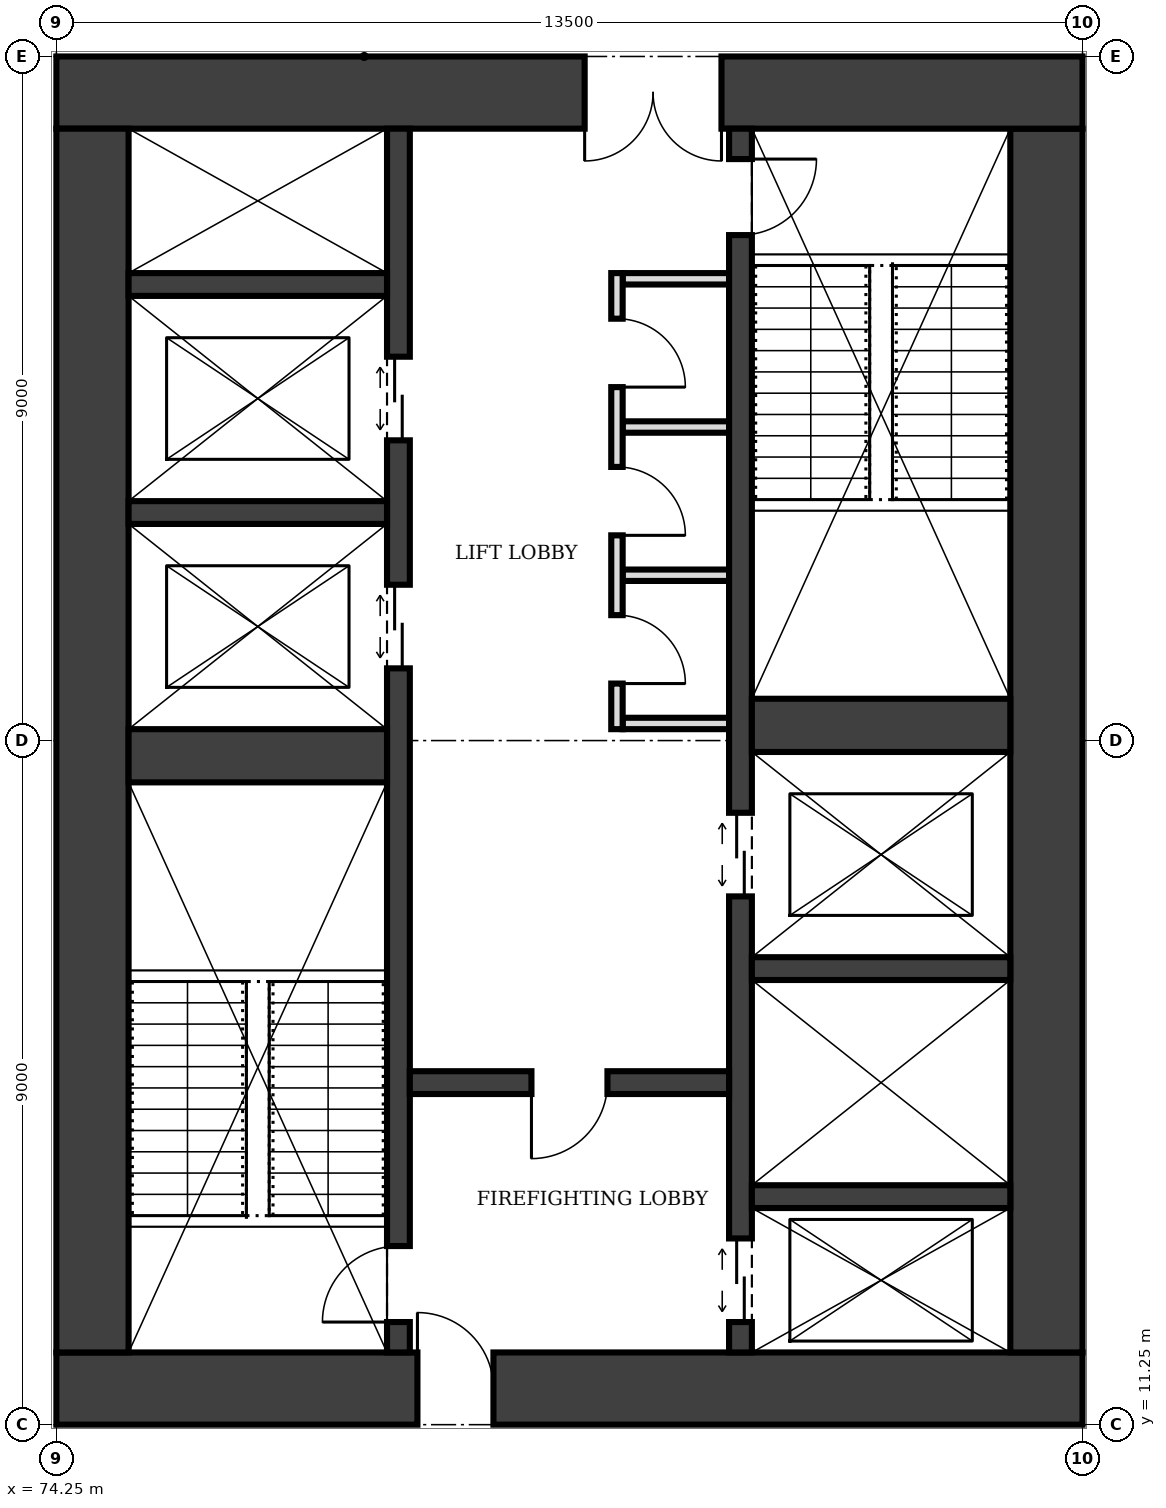
"""IFC4 building model, lengths in metres.
Left out: names, types, materials, properties, quantities, classifications, styles, units other than length and angle.
Written with IfcOpenShell. Run it as: python <this file> out.ifc"""

import sys

from ifc_helpers import new_model, si_unit, direction, frame, frame_2d, origin, place, context, subcontext, project, spatial, rectangle, extrude, element, fill, save


model = new_model("IFC4")
c1 = context("Model", 3, precision=1e-05, world=origin(), true_north=direction((0.0, 1.0)))
c2 = subcontext(c1, "Body", "Model", "MODEL_VIEW")
j1 = project(units=[si_unit("LENGTHUNIT", "METRE"), si_unit("PLANEANGLEUNIT", "RADIAN")], contexts=[c1])
p1 = place(None, origin())
s1 = spatial("IfcSite", under=j1, at=p1, CompositionType="ELEMENT")
p2 = place(p1, origin())
s2 = spatial("IfcBuilding", under=s1, at=p2, CompositionType="ELEMENT")
p3 = place(p2, frame((0.0, 0.0, 45.0)))
s3 = spatial("IfcBuildingStorey", under=s2, at=p3, CompositionType="ELEMENT", Elevation=45.0)
p4 = place(p3, frame((74.25, 11.725, 0.0), z_axis=(0.0, 0.0, 1.0), x_axis=(1.0, 0.0, 0.0)))
e1 = element("IfcWall", 1, at=p4, inside=s3, PredefinedType="SHEAR", context=c2, shape_type="SweptSolid", body=[
    extrude(rectangle(XDim=13.5, YDim=0.95, at=frame_2d((6.75, 0.0))), origin(), (0.0, 0.0, 1.0), 4.0),
])
p5 = place(p4, frame((4.75, 0.0, 0.0)))
e2 = element("IfcOpeningElement", 2, at=p5, cuts=e1, PredefinedType="OPENING", context=c2, shape_type="SweptSolid", body=[
    extrude(rectangle(XDim=1.0, YDim=2.1, at=frame_2d((0.5, 1.05))), frame((0.0, 0.485, 0.0), z_axis=(0.0, -1.0, 0.0), x_axis=(1.0, 0.0, 0.0)), (0.0, 0.0, 1.0), 0.97),
])
p6 = place(p3, frame((87.275, 12.2, 0.0), z_axis=(0.0, 0.0, 1.0), x_axis=(0.0, 1.0, 0.0)))
e3 = element("IfcWall", 3, at=p6, inside=s3, PredefinedType="SHEAR", context=c2, shape_type="SweptSolid", body=[
    extrude(rectangle(XDim=16.1, YDim=0.95, at=frame_2d((8.05, 0.0))), origin(), (0.0, 0.0, 1.0), 4.0),
])
p7 = place(p3, frame((87.75, 28.775, 0.0), z_axis=(0.0, 0.0, 1.0), x_axis=(-1.0, 0.0, 0.0)))
e4 = element("IfcWall", 4, at=p7, inside=s3, PredefinedType="SHEAR", context=c2, shape_type="SweptSolid", body=[
    extrude(rectangle(XDim=13.5, YDim=0.95, at=frame_2d((6.75, 0.0))), origin(), (0.0, 0.0, 1.0), 4.0),
])
p8 = place(p7, frame((4.75, 0.0, 0.0)))
e5 = element("IfcOpeningElement", 5, at=p8, cuts=e4, PredefinedType="OPENING", context=c2, shape_type="SweptSolid", body=[
    extrude(rectangle(XDim=1.8, YDim=2.1, at=frame_2d((0.9, 1.05))), frame((0.0, 0.485, 0.0), z_axis=(0.0, -1.0, 0.0), x_axis=(1.0, 0.0, 0.0)), (0.0, 0.0, 1.0), 0.97),
])
p9 = place(p3, frame((74.725, 28.3, 0.0), z_axis=(0.0, 0.0, 1.0), x_axis=(0.0, -1.0, 0.0)))
e6 = element("IfcWall", 6, at=p9, inside=s3, PredefinedType="SHEAR", context=c2, shape_type="SweptSolid", body=[
    extrude(rectangle(XDim=16.1, YDim=0.95, at=frame_2d((8.05, 0.0))), origin(), (0.0, 0.0, 1.0), 4.0),
])
p10 = place(p3, frame((78.75, 12.2, 0.0), z_axis=(0.0, 0.0, 1.0), x_axis=(0.0, 1.0, 0.0)))
e7 = element("IfcWall", 7, at=p10, inside=s3, PredefinedType="SHEAR", context=c2, shape_type="SweptSolid", body=[
    extrude(rectangle(XDim=16.1, YDim=0.3, at=frame_2d((8.05, 0.0))), origin(), (0.0, 0.0, 1.0), 4.0),
])
p11 = place(p10, frame((0.4, 0.0, 0.0)))
e8 = element("IfcOpeningElement", 8, at=p11, cuts=e7, PredefinedType="OPENING", context=c2, shape_type="SweptSolid", body=[
    extrude(rectangle(XDim=1.0, YDim=2.1, at=frame_2d((0.5, 1.05))), frame((0.0, 0.16, 0.0), z_axis=(0.0, -1.0, 0.0), x_axis=(1.0, 0.0, 0.0)), (0.0, 0.0, 1.0), 0.32),
])
p12 = place(p10, frame((9.0, 0.0, 0.0)))
e9 = element("IfcOpeningElement", 9, at=p12, cuts=e7, PredefinedType="OPENING", context=c2, shape_type="SweptSolid", body=[
    extrude(rectangle(XDim=1.1, YDim=2.1, at=frame_2d((0.55, 1.05))), frame((0.0, 0.16, 0.0), z_axis=(0.0, -1.0, 0.0), x_axis=(1.0, 0.0, 0.0)), (0.0, 0.0, 1.0), 0.32),
])
p13 = place(p10, frame((12.0, 0.0, 0.0)))
e10 = element("IfcOpeningElement", 10, at=p13, cuts=e7, PredefinedType="OPENING", context=c2, shape_type="SweptSolid", body=[
    extrude(rectangle(XDim=1.1, YDim=2.1, at=frame_2d((0.55, 1.05))), frame((0.0, 0.16, 0.0), z_axis=(0.0, -1.0, 0.0), x_axis=(1.0, 0.0, 0.0)), (0.0, 0.0, 1.0), 0.32),
])
p14 = place(p3, frame((83.25, 12.2, 0.0), z_axis=(0.0, 0.0, 1.0), x_axis=(0.0, 1.0, 0.0)))
e11 = element("IfcWall", 11, at=p14, inside=s3, PredefinedType="SHEAR", context=c2, shape_type="SweptSolid", body=[
    extrude(rectangle(XDim=16.1, YDim=0.3, at=frame_2d((8.05, 0.0))), origin(), (0.0, 0.0, 1.0), 4.0),
])
p15 = place(p14, frame((14.7, 0.0, 0.0)))
e12 = element("IfcOpeningElement", 12, at=p15, cuts=e11, PredefinedType="OPENING", context=c2, shape_type="SweptSolid", body=[
    extrude(rectangle(XDim=1.0, YDim=2.1, at=frame_2d((0.5, 1.05))), frame((0.0, 0.16, 0.0), z_axis=(0.0, -1.0, 0.0), x_axis=(1.0, 0.0, 0.0)), (0.0, 0.0, 1.0), 0.32),
])
p16 = place(p14, frame((0.4, 0.0, 0.0)))
e13 = element("IfcOpeningElement", 13, at=p16, cuts=e11, PredefinedType="OPENING", context=c2, shape_type="SweptSolid", body=[
    extrude(rectangle(XDim=1.1, YDim=2.1, at=frame_2d((0.55, 1.05))), frame((0.0, 0.16, 0.0), z_axis=(0.0, -1.0, 0.0), x_axis=(1.0, 0.0, 0.0)), (0.0, 0.0, 1.0), 0.32),
])
p17 = place(p14, frame((6.0, 0.0, 0.0)))
e14 = element("IfcOpeningElement", 14, at=p17, cuts=e11, PredefinedType="OPENING", context=c2, shape_type="SweptSolid", body=[
    extrude(rectangle(XDim=1.1, YDim=2.1, at=frame_2d((0.55, 1.05))), frame((0.0, 0.16, 0.0), z_axis=(0.0, -1.0, 0.0), x_axis=(1.0, 0.0, 0.0)), (0.0, 0.0, 1.0), 0.32),
])
p18 = place(p3, frame((75.2, 20.05, 0.0), z_axis=(0.0, 0.0, 1.0), x_axis=(1.0, 0.0, 0.0)))
e15 = element("IfcWall", 15, at=p18, inside=s3, PredefinedType="SHEAR", context=c2, shape_type="SweptSolid", body=[
    extrude(rectangle(XDim=3.4, YDim=0.7, at=frame_2d((1.7, 0.0))), origin(), (0.0, 0.0, 1.0), 4.0),
])
p19 = place(p3, frame((78.9, 15.75, 0.0), z_axis=(0.0, 0.0, 1.0), x_axis=(1.0, 0.0, 0.0)))
e16 = element("IfcWall", 16, at=p19, inside=s3, PredefinedType="SHEAR", context=c2, shape_type="SweptSolid", body=[
    extrude(rectangle(XDim=4.2, YDim=0.3, at=frame_2d((2.1, 0.0))), origin(), (0.0, 0.0, 1.0), 4.0),
])
p20 = place(p19, frame((1.6, 0.0, 0.0)))
e17 = element("IfcOpeningElement", 17, at=p20, cuts=e16, PredefinedType="OPENING", context=c2, shape_type="SweptSolid", body=[
    extrude(rectangle(XDim=1.0, YDim=2.1, at=frame_2d((0.5, 1.05))), frame((0.0, 0.16, 0.0), z_axis=(0.0, -1.0, 0.0), x_axis=(1.0, 0.0, 0.0)), (0.0, 0.0, 1.0), 0.32),
])
for number, where, z_axis, x_axis in (
    (18, (83.4, 14.25, 0.0), (0.0, 0.0, 1.0), (1.0, 0.0, 0.0)),
    (19, (83.4, 17.25, 0.0), (0.0, 0.0, 1.0), (1.0, 0.0, 0.0)),
):
    element("IfcWall", number, at=place(p3, frame(where, z_axis=z_axis, x_axis=x_axis)), inside=s3, PredefinedType="SHEAR", context=c2, shape_type="SweptSolid", body=[
        extrude(rectangle(XDim=3.4, YDim=0.3, at=frame_2d((1.7, 0.0))), origin(), (0.0, 0.0, 1.0), 4.0),
    ])
p21 = place(p3, frame((83.4, 20.45, 0.0), z_axis=(0.0, 0.0, 1.0), x_axis=(1.0, 0.0, 0.0)))
e20 = element("IfcWall", 20, at=p21, inside=s3, PredefinedType="SHEAR", context=c2, shape_type="SweptSolid", body=[
    extrude(rectangle(XDim=3.4, YDim=0.7, at=frame_2d((1.7, 0.0))), origin(), (0.0, 0.0, 1.0), 4.0),
])
for number, where, z_axis, x_axis in (
    (21, (75.2, 23.25, 0.0), (0.0, 0.0, 1.0), (1.0, 0.0, 0.0)),
    (22, (75.2, 26.25, 0.0), (0.0, 0.0, 1.0), (1.0, 0.0, 0.0)),
):
    element("IfcWall", number, at=place(p3, frame(where, z_axis=z_axis, x_axis=x_axis)), inside=s3, PredefinedType="SHEAR", context=c2, shape_type="SweptSolid", body=[
        extrude(rectangle(XDim=3.4, YDim=0.3, at=frame_2d((1.7, 0.0))), origin(), (0.0, 0.0, 1.0), 4.0),
    ])
p22 = place(p3, frame((81.625, 20.4, 0.0), z_axis=(0.0, 0.0, 1.0), x_axis=(0.0, 1.0, 0.0)))
e23 = element("IfcWall", 23, at=p22, inside=s3, PredefinedType="PARTITIONING", context=c2, shape_type="SweptSolid", body=[
    extrude(rectangle(XDim=6.0, YDim=0.15, at=frame_2d((3.0, 0.0))), origin(), (0.0, 0.0, 1.0), 3.75),
])
p23 = place(p22, frame((0.6, 0.0, 0.0)))
e24 = element("IfcOpeningElement", 24, at=p23, cuts=e23, PredefinedType="OPENING", context=c2, shape_type="SweptSolid", body=[
    extrude(rectangle(XDim=0.9, YDim=2.1, at=frame_2d((0.45, 1.05))), frame((0.0, 0.085, 0.0), z_axis=(0.0, -1.0, 0.0), x_axis=(1.0, 0.0, 0.0)), (0.0, 0.0, 1.0), 0.17),
])
p24 = place(p22, frame((2.55, 0.0, 0.0)))
e25 = element("IfcOpeningElement", 25, at=p24, cuts=e23, PredefinedType="OPENING", context=c2, shape_type="SweptSolid", body=[
    extrude(rectangle(XDim=0.9, YDim=2.1, at=frame_2d((0.45, 1.05))), frame((0.0, 0.085, 0.0), z_axis=(0.0, -1.0, 0.0), x_axis=(1.0, 0.0, 0.0)), (0.0, 0.0, 1.0), 0.17),
])
p25 = place(p22, frame((4.5, 0.0, 0.0)))
e26 = element("IfcOpeningElement", 26, at=p25, cuts=e23, PredefinedType="OPENING", context=c2, shape_type="SweptSolid", body=[
    extrude(rectangle(XDim=0.9, YDim=2.1, at=frame_2d((0.45, 1.05))), frame((0.0, 0.085, 0.0), z_axis=(0.0, -1.0, 0.0), x_axis=(1.0, 0.0, 0.0)), (0.0, 0.0, 1.0), 0.17),
])
for number, where, z_axis, x_axis in (
    (27, (81.7, 20.475, 0.0), (0.0, 0.0, 1.0), (1.0, 0.0, 0.0)),
    (28, (81.7, 22.425, 0.0), (0.0, 0.0, 1.0), (1.0, 0.0, 0.0)),
    (29, (81.7, 24.375, 0.0), (0.0, 0.0, 1.0), (1.0, 0.0, 0.0)),
    (30, (81.7, 26.325, 0.0), (0.0, 0.0, 1.0), (1.0, 0.0, 0.0)),
):
    element("IfcWall", number, at=place(p3, frame(where, z_axis=z_axis, x_axis=x_axis)), inside=s3, PredefinedType="PARTITIONING", context=c2, shape_type="SweptSolid", body=[
        extrude(rectangle(XDim=1.4, YDim=0.15, at=frame_2d((0.7, 0.0))), origin(), (0.0, 0.0, 1.0), 3.75),
    ])
p26 = place(p5, origin())
e31 = element("IfcDoor", 31, at=p26, inside=s3, OperationType="SINGLE_SWING_LEFT", PredefinedType="DOOR", context=c2, shape_type="SweptSolid", body=[
    extrude(rectangle(XDim=1.0, YDim=2.1, at=frame_2d((0.5, 1.05))), frame((0.0, 0.025, 0.0), z_axis=(0.0, -1.0, 0.0), x_axis=(1.0, 0.0, 0.0)), (0.0, 0.0, 1.0), 0.05),
])
fill(e2, e31)
p27 = place(p8, origin())
e32 = element("IfcDoor", 32, at=p27, inside=s3, OperationType="DOUBLE_DOOR_SINGLE_SWING", PredefinedType="DOOR", context=c2, shape_type="SweptSolid", body=[
    extrude(rectangle(XDim=1.8, YDim=2.1, at=frame_2d((0.9, 1.05))), frame((0.0, 0.025, 0.0), z_axis=(0.0, -1.0, 0.0), x_axis=(1.0, 0.0, 0.0)), (0.0, 0.0, 1.0), 0.05),
])
fill(e5, e32)
p28 = place(p20, frame((1.0, 0.0, 0.0), z_axis=(0.0, 0.0, 1.0), x_axis=(-1.0, 0.0, 0.0)))
e33 = element("IfcDoor", 33, at=p28, inside=s3, OperationType="SINGLE_SWING_RIGHT", PredefinedType="DOOR", context=c2, shape_type="SweptSolid", body=[
    extrude(rectangle(XDim=1.0, YDim=2.1, at=frame_2d((0.5, 1.05))), frame((0.0, 0.025, 0.0), z_axis=(0.0, -1.0, 0.0), x_axis=(1.0, 0.0, 0.0)), (0.0, 0.0, 1.0), 0.05),
])
fill(e17, e33)
p29 = place(p11, origin())
e34 = element("IfcDoor", 34, at=p29, inside=s3, OperationType="SINGLE_SWING_LEFT", PredefinedType="DOOR", context=c2, shape_type="SweptSolid", body=[
    extrude(rectangle(XDim=1.0, YDim=2.1, at=frame_2d((0.5, 1.05))), frame((0.0, 0.025, 0.0), z_axis=(0.0, -1.0, 0.0), x_axis=(1.0, 0.0, 0.0)), (0.0, 0.0, 1.0), 0.05),
])
fill(e8, e34)
p30 = place(p15, frame((1.0, 0.0, 0.0), z_axis=(0.0, 0.0, 1.0), x_axis=(-1.0, 0.0, 0.0)))
e35 = element("IfcDoor", 35, at=p30, inside=s3, OperationType="SINGLE_SWING_LEFT", PredefinedType="DOOR", context=c2, shape_type="SweptSolid", body=[
    extrude(rectangle(XDim=1.0, YDim=2.1, at=frame_2d((0.5, 1.05))), frame((0.0, 0.025, 0.0), z_axis=(0.0, -1.0, 0.0), x_axis=(1.0, 0.0, 0.0)), (0.0, 0.0, 1.0), 0.05),
])
fill(e12, e35)
p31 = place(p16, origin())
e36 = element("IfcDoor", 36, at=p31, inside=s3, OperationType="DOUBLE_DOOR_SLIDING", PredefinedType="DOOR", context=c2, shape_type="SweptSolid", body=[
    extrude(rectangle(XDim=1.1, YDim=2.1, at=frame_2d((0.55, 1.05))), frame((0.0, 0.025, 0.0), z_axis=(0.0, -1.0, 0.0), x_axis=(1.0, 0.0, 0.0)), (0.0, 0.0, 1.0), 0.05),
])
fill(e13, e36)
p32 = place(p12, origin())
e37 = element("IfcDoor", 37, at=p32, inside=s3, OperationType="DOUBLE_DOOR_SLIDING", PredefinedType="DOOR", context=c2, shape_type="SweptSolid", body=[
    extrude(rectangle(XDim=1.1, YDim=2.1, at=frame_2d((0.55, 1.05))), frame((0.0, 0.025, 0.0), z_axis=(0.0, -1.0, 0.0), x_axis=(1.0, 0.0, 0.0)), (0.0, 0.0, 1.0), 0.05),
])
fill(e9, e37)
p33 = place(p13, origin())
e38 = element("IfcDoor", 38, at=p33, inside=s3, OperationType="DOUBLE_DOOR_SLIDING", PredefinedType="DOOR", context=c2, shape_type="SweptSolid", body=[
    extrude(rectangle(XDim=1.1, YDim=2.1, at=frame_2d((0.55, 1.05))), frame((0.0, 0.025, 0.0), z_axis=(0.0, -1.0, 0.0), x_axis=(1.0, 0.0, 0.0)), (0.0, 0.0, 1.0), 0.05),
])
fill(e10, e38)
p34 = place(p17, origin())
e39 = element("IfcDoor", 39, at=p34, inside=s3, OperationType="DOUBLE_DOOR_SLIDING", PredefinedType="DOOR", context=c2, shape_type="SweptSolid", body=[
    extrude(rectangle(XDim=1.1, YDim=2.1, at=frame_2d((0.55, 1.05))), frame((0.0, 0.025, 0.0), z_axis=(0.0, -1.0, 0.0), x_axis=(1.0, 0.0, 0.0)), (0.0, 0.0, 1.0), 0.05),
])
fill(e14, e39)
p35 = place(p23, frame((0.9, 0.0, 0.0), z_axis=(0.0, 0.0, 1.0), x_axis=(-1.0, 0.0, 0.0)))
e40 = element("IfcDoor", 40, at=p35, inside=s3, OperationType="SINGLE_SWING_RIGHT", PredefinedType="DOOR", context=c2, shape_type="SweptSolid", body=[
    extrude(rectangle(XDim=0.9, YDim=2.1, at=frame_2d((0.45, 1.05))), frame((0.0, 0.025, 0.0), z_axis=(0.0, -1.0, 0.0), x_axis=(1.0, 0.0, 0.0)), (0.0, 0.0, 1.0), 0.05),
])
fill(e24, e40)
p36 = place(p24, frame((0.9, 0.0, 0.0), z_axis=(0.0, 0.0, 1.0), x_axis=(-1.0, 0.0, 0.0)))
e41 = element("IfcDoor", 41, at=p36, inside=s3, OperationType="SINGLE_SWING_RIGHT", PredefinedType="DOOR", context=c2, shape_type="SweptSolid", body=[
    extrude(rectangle(XDim=0.9, YDim=2.1, at=frame_2d((0.45, 1.05))), frame((0.0, 0.025, 0.0), z_axis=(0.0, -1.0, 0.0), x_axis=(1.0, 0.0, 0.0)), (0.0, 0.0, 1.0), 0.05),
])
fill(e25, e41)
p37 = place(p25, frame((0.9, 0.0, 0.0), z_axis=(0.0, 0.0, 1.0), x_axis=(-1.0, 0.0, 0.0)))
e42 = element("IfcDoor", 42, at=p37, inside=s3, OperationType="SINGLE_SWING_RIGHT", PredefinedType="DOOR", context=c2, shape_type="SweptSolid", body=[
    extrude(rectangle(XDim=0.9, YDim=2.1, at=frame_2d((0.45, 1.05))), frame((0.0, 0.025, 0.0), z_axis=(0.0, -1.0, 0.0), x_axis=(1.0, 0.0, 0.0)), (0.0, 0.0, 1.0), 0.05),
])
fill(e26, e42)
save(model, sys.argv[1])
